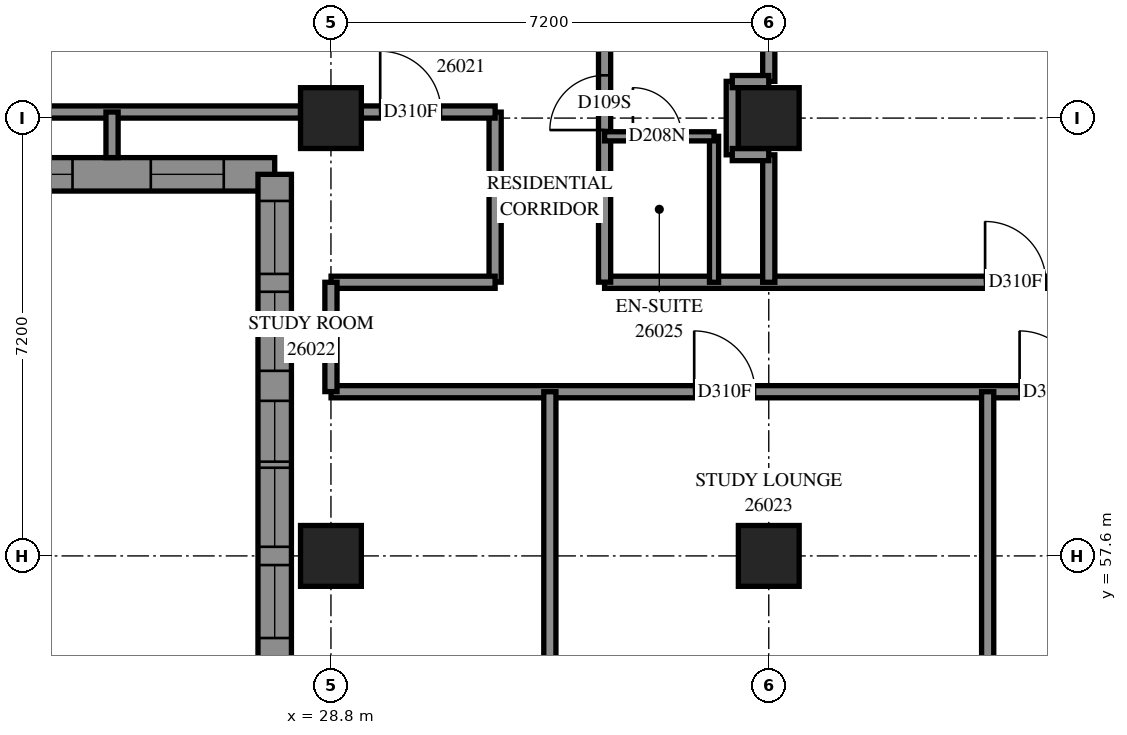
"""IFC4 building model, lengths in metres.
Left out: names, types, materials, properties, quantities, classifications, styles, units other than length and angle.
Written with IfcOpenShell. Run it as: python <this file> out.ifc"""

import sys

from ifc_helpers import new_model, si_unit, direction, frame, frame_2d, origin, origin_2d, place, context, subcontext, project, spatial, polyline, rectangle, outline, extrude, element, fill, save


model = new_model("IFC4")
c1 = context("Model", 3, precision=1e-05, world=origin(), true_north=direction((0.0, 1.0)))
c2 = subcontext(c1, "Body", "Model", "MODEL_VIEW")
j1 = project(units=[si_unit("LENGTHUNIT", "METRE"), si_unit("PLANEANGLEUNIT", "RADIAN")], contexts=[c1])
p1 = place(None, origin())
s1 = spatial("IfcSite", under=j1, at=p1, CompositionType="ELEMENT")
p2 = place(p1, origin())
s2 = spatial("IfcBuilding", under=s1, at=p2, CompositionType="ELEMENT")
p3 = place(p2, frame((0.0, 0.0, 98.2)))
s3 = spatial("IfcBuildingStorey", under=s2, at=p3, CompositionType="ELEMENT", Elevation=98.2)
for number, where, z_axis, x_axis in (
    (1, (28.8, 57.6, 0.0), (0.0, 0.0, 1.0), (1.0, 0.0, 0.0)),
    (2, (28.8, 64.8, 0.0), (0.0, 0.0, 1.0), (1.0, 0.0, 0.0)),
    (3, (36.0, 57.6, 0.0), (0.0, 0.0, 1.0), (1.0, 0.0, 0.0)),
    (4, (36.0, 64.8, 0.0), (0.0, 0.0, 1.0), (1.0, 0.0, 0.0)),
):
    element("IfcColumn", number, at=place(p3, frame(where, z_axis=z_axis, x_axis=x_axis)), inside=s3, PredefinedType="COLUMN", context=c2, shape_type="SweptSolid", body=[
        extrude(rectangle(XDim=1.0, YDim=1.0, at=origin_2d()), origin(), (0.0, 0.0, 1.0), 3.1),
    ])
p4 = place(p3, frame((19.624, 63.875, 0.0), z_axis=(0.0, 0.0, 1.0), x_axis=(1.0, 0.0, 0.0)))
e5 = element("IfcWall", 5, at=p4, inside=s3, PredefinedType="SOLIDWALL", context=c2, shape_type="SweptSolid", body=[
    extrude(outline(polyline([(-0.275, -0.275), (7.976, -0.275), (8.526, 0.275), (0.275, 0.275), (-0.275, -0.275)])), origin(), (0.0, 0.0, 1.0), 3.1),
])
p5 = place(p4, frame((2.126, 0.0, 0.5)))
e6 = element("IfcOpeningElement", 6, at=p5, cuts=e5, PredefinedType="OPENING", context=c2, shape_type="SweptSolid", body=[
    extrude(rectangle(XDim=1.3, YDim=2.45, at=frame_2d((0.65, 1.225))), frame((0.0, 0.285, 0.0), z_axis=(0.0, -1.0, 0.0), x_axis=(1.0, 0.0, 0.0)), (0.0, 0.0, 1.0), 0.57),
])
p6 = place(p4, frame((3.626, 0.0, 0.5)))
e7 = element("IfcOpeningElement", 7, at=p6, cuts=e5, PredefinedType="OPENING", context=c2, shape_type="SweptSolid", body=[
    extrude(rectangle(XDim=1.3, YDim=2.45, at=frame_2d((0.65, 1.225))), frame((0.0, 0.285, 0.0), z_axis=(0.0, -1.0, 0.0), x_axis=(1.0, 0.0, 0.0)), (0.0, 0.0, 1.0), 0.57),
])
p7 = place(p4, frame((0.625, 0.0, 0.5)))
e8 = element("IfcOpeningElement", 8, at=p7, cuts=e5, PredefinedType="OPENING", context=c2, shape_type="SweptSolid", body=[
    extrude(rectangle(XDim=1.2, YDim=2.45, at=frame_2d((0.6, 1.225))), frame((0.0, 0.285, 0.0), z_axis=(0.0, -1.0, 0.0), x_axis=(1.0, 0.0, 0.0)), (0.0, 0.0, 1.0), 0.57),
])
p8 = place(p4, frame((6.213, 0.0, 0.5)))
e9 = element("IfcOpeningElement", 9, at=p8, cuts=e5, PredefinedType="OPENING", context=c2, shape_type="SweptSolid", body=[
    extrude(rectangle(XDim=1.2, YDim=2.45, at=frame_2d((0.6, 1.225))), frame((0.0, 0.285, 0.0), z_axis=(0.0, -1.0, 0.0), x_axis=(1.0, 0.0, 0.0)), (0.0, 0.0, 1.0), 0.57),
])
p9 = place(p3, frame((27.875, 63.875, 0.0), z_axis=(0.0, 0.0, 1.0), x_axis=(0.0, -1.0, 0.0)))
e10 = element("IfcWall", 10, at=p9, inside=s3, PredefinedType="SOLIDWALL", context=c2, shape_type="SweptSolid", body=[
    extrude(outline(polyline([(0.275, -0.275), (8.526, -0.275), (7.976, 0.275), (-0.275, 0.275), (0.275, -0.275)])), origin(), (0.0, 0.0, 1.0), 3.1),
])
p10 = place(p9, frame((4.825, 0.0, 0.5)))
e11 = element("IfcOpeningElement", 11, at=p10, cuts=e10, PredefinedType="OPENING", context=c2, shape_type="SweptSolid", body=[
    extrude(rectangle(XDim=1.3, YDim=2.45, at=frame_2d((0.65, 1.225))), frame((0.0, 0.285, 0.0), z_axis=(0.0, -1.0, 0.0), x_axis=(1.0, 0.0, 0.0)), (0.0, 0.0, 1.0), 0.57),
])
p11 = place(p9, frame((0.438, 0.0, 0.5)))
e12 = element("IfcOpeningElement", 12, at=p11, cuts=e10, PredefinedType="OPENING", context=c2, shape_type="SweptSolid", body=[
    extrude(rectangle(XDim=1.2, YDim=2.45, at=frame_2d((0.6, 1.225))), frame((0.0, 0.285, 0.0), z_axis=(0.0, -1.0, 0.0), x_axis=(1.0, 0.0, 0.0)), (0.0, 0.0, 1.0), 0.57),
])
p12 = place(p9, frame((6.426, 0.0, 0.5)))
e13 = element("IfcOpeningElement", 13, at=p12, cuts=e10, PredefinedType="OPENING", context=c2, shape_type="SweptSolid", body=[
    extrude(rectangle(XDim=1.2, YDim=2.45, at=frame_2d((0.6, 1.225))), frame((0.0, 0.285, 0.0), z_axis=(0.0, -1.0, 0.0), x_axis=(1.0, 0.0, 0.0)), (0.0, 0.0, 1.0), 0.57),
])
p13 = place(p9, frame((1.931, 0.0, 0.5)))
e14 = element("IfcOpeningElement", 14, at=p13, cuts=e10, PredefinedType="OPENING", context=c2, shape_type="SweptSolid", body=[
    extrude(rectangle(XDim=1.3, YDim=2.45, at=frame_2d((0.65, 1.225))), frame((0.0, 0.285, 0.0), z_axis=(0.0, -1.0, 0.0), x_axis=(1.0, 0.0, 0.0)), (0.0, 0.0, 1.0), 0.57),
])
p14 = place(p9, frame((3.725, 0.0, 0.45)))
e15 = element("IfcOpeningElement", 15, at=p14, cuts=e10, PredefinedType="OPENING", context=c2, shape_type="SweptSolid", body=[
    extrude(rectangle(XDim=1.0, YDim=2.5, at=frame_2d((0.5, 1.25))), frame((0.0, 0.285, 0.0), z_axis=(0.0, -1.0, 0.0), x_axis=(1.0, 0.0, 0.0)), (0.0, 0.0, 1.0), 0.57),
])
p15 = place(p3, frame((28.802, 60.3, 0.0), z_axis=(0.0, 0.0, 1.0), x_axis=(1.0, 0.0, 0.0)))
e16 = element("IfcWall", 16, at=p15, inside=s3, PredefinedType="PARTITIONING", context=c2, shape_type="SweptSolid", body=[
    extrude(rectangle(XDim=24.298, YDim=0.2, at=frame_2d((12.149, 0.0))), origin(), (0.0, 0.0, 1.0), 3.1),
])
p16 = place(p15, frame((5.972, 0.0, 0.0)))
e17 = element("IfcOpeningElement", 17, at=p16, cuts=e16, PredefinedType="OPENING", context=c2, shape_type="SweptSolid", body=[
    extrude(rectangle(XDim=1.0, YDim=2.1, at=frame_2d((0.5, 1.05))), frame((0.0, 0.11, 0.0), z_axis=(0.0, -1.0, 0.0), x_axis=(1.0, 0.0, 0.0)), (0.0, 0.0, 1.0), 0.22),
])
p17 = place(p15, frame((11.323, 0.0, 0.0)))
e18 = element("IfcOpeningElement", 18, at=p17, cuts=e16, PredefinedType="OPENING", context=c2, shape_type="SweptSolid", body=[
    extrude(rectangle(XDim=1.0, YDim=2.1, at=frame_2d((0.5, 1.05))), frame((0.0, 0.11, 0.0), z_axis=(0.0, -1.0, 0.0), x_axis=(1.0, 0.0, 0.0)), (0.0, 0.0, 1.0), 0.22),
])
p18 = place(p15, frame((14.798, 0.0, 0.0)))
e19 = element("IfcOpeningElement", 19, at=p18, cuts=e16, PredefinedType="OPENING", context=c2, shape_type="SweptSolid", body=[
    extrude(rectangle(XDim=0.9, YDim=2.1, at=frame_2d((0.45, 1.05))), frame((0.0, 0.11, 0.0), z_axis=(0.0, -1.0, 0.0), x_axis=(1.0, 0.0, 0.0)), (0.0, 0.0, 1.0), 0.22),
])
p19 = place(p15, frame((18.833, 0.0, 0.0)))
e20 = element("IfcOpeningElement", 20, at=p19, cuts=e16, PredefinedType="OPENING", context=c2, shape_type="SweptSolid", body=[
    extrude(rectangle(XDim=1.0, YDim=2.1, at=frame_2d((0.5, 1.05))), frame((0.0, 0.11, 0.0), z_axis=(0.0, -1.0, 0.0), x_axis=(1.0, 0.0, 0.0)), (0.0, 0.0, 1.0), 0.22),
])
p20 = place(p15, frame((23.151, 0.0, 0.0)))
e21 = element("IfcOpeningElement", 21, at=p20, cuts=e16, PredefinedType="OPENING", context=c2, shape_type="SweptSolid", body=[
    extrude(rectangle(XDim=1.0, YDim=2.1, at=frame_2d((0.5, 1.05))), frame((0.0, 0.11, 0.0), z_axis=(0.0, -1.0, 0.0), x_axis=(1.0, 0.0, 0.0)), (0.0, 0.0, 1.0), 0.22),
])
p21 = place(p3, frame((33.3, 62.1, 0.0), z_axis=(0.0, 0.0, 1.0), x_axis=(1.0, 0.0, 0.0)))
e22 = element("IfcWall", 22, at=p21, inside=s3, PredefinedType="PARTITIONING", context=c2, shape_type="SweptSolid", body=[
    extrude(rectangle(XDim=17.1, YDim=0.2, at=frame_2d((8.55, 0.0))), origin(), (0.0, 0.0, 1.0), 3.1),
])
p22 = place(p21, frame((6.258, 0.0, 0.0)))
e23 = element("IfcOpeningElement", 23, at=p22, cuts=e22, PredefinedType="OPENING", context=c2, shape_type="SweptSolid", body=[
    extrude(rectangle(XDim=1.0, YDim=2.1, at=frame_2d((0.5, 1.05))), frame((0.0, 0.11, 0.0), z_axis=(0.0, -1.0, 0.0), x_axis=(1.0, 0.0, 0.0)), (0.0, 0.0, 1.0), 0.22),
])
p23 = place(p21, frame((10.148, 0.0, 0.0)))
e24 = element("IfcOpeningElement", 24, at=p23, cuts=e22, PredefinedType="OPENING", context=c2, shape_type="SweptSolid", body=[
    extrude(rectangle(XDim=0.9, YDim=2.1, at=frame_2d((0.45, 1.05))), frame((0.0, 0.11, 0.0), z_axis=(0.0, -1.0, 0.0), x_axis=(1.0, 0.0, 0.0)), (0.0, 0.0, 1.0), 0.22),
])
p24 = place(p21, frame((15.729, 0.0, 0.0)))
e25 = element("IfcOpeningElement", 25, at=p24, cuts=e22, PredefinedType="OPENING", context=c2, shape_type="SweptSolid", body=[
    extrude(rectangle(XDim=0.9, YDim=2.1, at=frame_2d((0.45, 1.05))), frame((0.0, 0.11, 0.0), z_axis=(0.0, -1.0, 0.0), x_axis=(1.0, 0.0, 0.0)), (0.0, 0.0, 1.0), 0.22),
])
p25 = place(p3, frame((22.1, 64.9, 0.0), z_axis=(0.0, 0.0, 1.0), x_axis=(1.0, 0.0, 0.0)))
e26 = element("IfcWall", 26, at=p25, inside=s3, PredefinedType="PARTITIONING", context=c2, shape_type="SweptSolid", body=[
    extrude(rectangle(XDim=6.2, YDim=0.2, at=frame_2d((3.1, 0.0))), origin(), (0.0, 0.0, 1.0), 2.6),
])
p26 = place(p3, frame((36.0, 65.404, 0.0), z_axis=(0.0, 0.0, 1.0), x_axis=(0.0, 1.0, 0.0)))
e27 = element("IfcWall", 27, at=p26, inside=s3, PredefinedType="PARTITIONING", context=c2, shape_type="SweptSolid", body=[
    extrude(rectangle(XDim=5.992, YDim=0.2, at=frame_2d((2.996, 0.0))), origin(), (0.0, 0.0, 1.0), 3.1),
])
p27 = place(p3, frame((33.3, 62.102, 0.0), z_axis=(0.0, 0.0, 1.0), x_axis=(0.0, 1.0, 0.0)))
e28 = element("IfcWall", 28, at=p27, inside=s3, PredefinedType="PARTITIONING", context=c2, shape_type="SweptSolid", body=[
    extrude(rectangle(XDim=4.598, YDim=0.2, at=frame_2d((2.299, 0.0))), origin(), (0.0, 0.0, 1.0), 3.1),
])
p28 = place(p27, frame((2.501, 0.0, 0.0)))
e29 = element("IfcOpeningElement", 29, at=p28, cuts=e28, PredefinedType="OPENING", context=c2, shape_type="SweptSolid", body=[
    extrude(rectangle(XDim=0.9, YDim=2.1, at=frame_2d((0.45, 1.05))), frame((0.0, 0.11, 0.0), z_axis=(0.0, -1.0, 0.0), x_axis=(1.0, 0.0, 0.0)), (0.0, 0.0, 1.0), 0.22),
])
for number, where, z_axis, x_axis in (
    (30, (32.4, 55.899, 0.0), (0.0, 0.0, 1.0), (0.0, 1.0, 0.0)),
    (31, (39.6, 55.899, 0.0), (0.0, 0.0, 1.0), (0.0, 1.0, 0.0)),
):
    element("IfcWall", number, at=place(p3, frame(where, z_axis=z_axis, x_axis=x_axis)), inside=s3, PredefinedType="PARTITIONING", context=c2, shape_type="SweptSolid", body=[
        extrude(rectangle(XDim=4.401, YDim=0.2, at=frame_2d((2.2, 0.0))), origin(), (0.0, 0.0, 1.0), 3.1),
    ])
p29 = place(p3, frame((31.5, 62.102, 0.0), z_axis=(0.0, 0.0, 1.0), x_axis=(0.0, 1.0, 0.0)))
e32 = element("IfcWall", 32, at=p29, inside=s3, PredefinedType="PARTITIONING", context=c2, shape_type="SweptSolid", body=[
    extrude(rectangle(XDim=2.796, YDim=0.2, at=frame_2d((1.398, 0.0))), origin(), (0.0, 0.0, 1.0), 3.1),
])
p30 = place(p3, frame((28.802, 62.1, 0.0), z_axis=(0.0, 0.0, 1.0), x_axis=(1.0, 0.0, 0.0)))
e33 = element("IfcWall", 33, at=p30, inside=s3, PredefinedType="PARTITIONING", context=c2, shape_type="SweptSolid", body=[
    extrude(rectangle(XDim=2.698, YDim=0.2, at=frame_2d((1.349, 0.0))), origin(), (0.0, 0.0, 1.0), 3.1),
])
p31 = place(p3, frame((35.1, 62.1, 0.0), z_axis=(0.0, 0.0, 1.0), x_axis=(0.0, 1.0, 0.0)))
e34 = element("IfcWall", 34, at=p31, inside=s3, PredefinedType="PARTITIONING", context=c2, shape_type="SweptSolid", body=[
    extrude(rectangle(XDim=2.4, YDim=0.15, at=frame_2d((1.2, 0.0))), origin(), (0.0, 0.0, 1.0), 3.1),
])
p32 = place(p3, frame((29.3, 64.9, 0.0), z_axis=(0.0, 0.0, 1.0), x_axis=(1.0, 0.0, 0.0)))
e35 = element("IfcWall", 35, at=p32, inside=s3, PredefinedType="PARTITIONING", context=c2, shape_type="SweptSolid", body=[
    extrude(rectangle(XDim=2.2, YDim=0.2, at=frame_2d((1.1, 0.0))), origin(), (0.0, 0.0, 1.0), 3.1),
])
p33 = place(p32, frame((0.31, 0.0, 0.0)))
e36 = element("IfcOpeningElement", 36, at=p33, cuts=e35, PredefinedType="OPENING", context=c2, shape_type="SweptSolid", body=[
    extrude(rectangle(XDim=1.0, YDim=2.1, at=frame_2d((0.5, 1.05))), frame((0.0, 0.11, 0.0), z_axis=(0.0, -1.0, 0.0), x_axis=(1.0, 0.0, 0.0)), (0.0, 0.0, 1.0), 0.22),
])
p34 = place(p3, frame((36.0, 62.1, 0.0), z_axis=(0.0, 0.0, 1.0), x_axis=(0.0, 1.0, 0.0)))
e37 = element("IfcWall", 37, at=p34, inside=s3, PredefinedType="PARTITIONING", context=c2, shape_type="SweptSolid", body=[
    extrude(rectangle(XDim=2.096, YDim=0.2, at=frame_2d((1.048, 0.0))), origin(), (0.0, 0.0, 1.0), 3.1),
])
p35 = place(p3, frame((33.3, 64.5, 0.0), z_axis=(0.0, 0.0, 1.0), x_axis=(1.0, 0.0, 0.0)))
e38 = element("IfcWall", 38, at=p35, inside=s3, PredefinedType="PARTITIONING", context=c2, shape_type="SweptSolid", body=[
    extrude(rectangle(XDim=1.8, YDim=0.15, at=frame_2d((0.9, 0.0))), origin(), (0.0, 0.0, 1.0), 3.1),
])
p36 = place(p35, frame((0.466, 0.0, 0.0)))
e39 = element("IfcOpeningElement", 39, at=p36, cuts=e38, PredefinedType="OPENING", context=c2, shape_type="SweptSolid", body=[
    extrude(rectangle(XDim=0.8, YDim=2.1, at=frame_2d((0.4, 1.05))), frame((0.0, 0.085, 0.0), z_axis=(0.0, -1.0, 0.0), x_axis=(1.0, 0.0, 0.0)), (0.0, 0.0, 1.0), 0.17),
])
p37 = place(p3, frame((28.8, 60.302, 0.0), z_axis=(0.0, 0.0, 1.0), x_axis=(0.0, 1.0, 0.0)))
e40 = element("IfcWall", 40, at=p37, inside=s3, PredefinedType="PARTITIONING", context=c2, shape_type="SweptSolid", body=[
    extrude(rectangle(XDim=1.798, YDim=0.2, at=frame_2d((0.899, 0.0))), origin(), (0.0, 0.0, 1.0), 2.6),
])
p38 = place(p3, frame((35.4, 64.196, 0.0), z_axis=(0.0, 0.0, 1.0), x_axis=(0.0, 1.0, 0.0)))
e41 = element("IfcWall", 41, at=p38, inside=s3, PredefinedType="PARTITIONING", context=c2, shape_type="SweptSolid", body=[
    extrude(rectangle(XDim=1.208, YDim=0.2, at=frame_2d((0.604, 0.0))), origin(), (0.0, 0.0, 1.0), 3.1),
])
p39 = place(p3, frame((25.2, 64.15, 0.0), z_axis=(0.0, 0.0, 1.0), x_axis=(0.0, 1.0, 0.0)))
e42 = element("IfcWall", 42, at=p39, inside=s3, PredefinedType="PARTITIONING", context=c2, shape_type="SweptSolid", body=[
    extrude(rectangle(XDim=0.75, YDim=0.2, at=frame_2d((0.375, 0.0))), origin(), (0.0, 0.0, 1.0), 3.1),
])
for number, where, z_axis, x_axis in (
    (43, (35.4, 65.4, 0.0), (0.0, 0.0, 1.0), (1.0, 0.0, 0.0)),
    (44, (35.4, 64.2, 0.0), (0.0, 0.0, 1.0), (1.0, 0.0, 0.0)),
):
    element("IfcWall", number, at=place(p3, frame(where, z_axis=z_axis, x_axis=x_axis)), inside=s3, PredefinedType="PARTITIONING", context=c2, shape_type="SweptSolid", body=[
        extrude(rectangle(XDim=0.6, YDim=0.2, at=frame_2d((0.3, 0.0))), origin(), (0.0, 0.0, 1.0), 3.1),
    ])
p40 = place(p6, origin())
e45 = element("IfcWindow", 45, at=p40, inside=s3, PartitioningType="SINGLE_PANEL", PredefinedType="WINDOW", context=c2, shape_type="SweptSolid", body=[
    extrude(rectangle(XDim=1.3, YDim=2.45, at=frame_2d((0.65, 1.225))), frame((0.0, 0.155, 0.0), z_axis=(0.0, -1.0, 0.0), x_axis=(1.0, 0.0, 0.0)), (0.0, 0.0, 1.0), 0.06),
])
fill(e7, e45)
p41 = place(p8, origin())
e46 = element("IfcWindow", 46, at=p41, inside=s3, PartitioningType="SINGLE_PANEL", PredefinedType="WINDOW", context=c2, shape_type="SweptSolid", body=[
    extrude(rectangle(XDim=1.2, YDim=2.45, at=frame_2d((0.6, 1.225))), frame((0.0, 0.155, 0.0), z_axis=(0.0, -1.0, 0.0), x_axis=(1.0, 0.0, 0.0)), (0.0, 0.0, 1.0), 0.06),
])
fill(e9, e46)
p42 = place(p10, origin())
e47 = element("IfcWindow", 47, at=p42, inside=s3, PartitioningType="SINGLE_PANEL", PredefinedType="WINDOW", context=c2, shape_type="SweptSolid", body=[
    extrude(rectangle(XDim=1.3, YDim=2.45, at=frame_2d((0.65, 1.225))), frame((0.0, 0.155, 0.0), z_axis=(0.0, -1.0, 0.0), x_axis=(1.0, 0.0, 0.0)), (0.0, 0.0, 1.0), 0.06),
])
fill(e11, e47)
p43 = place(p11, origin())
e48 = element("IfcWindow", 48, at=p43, inside=s3, PartitioningType="SINGLE_PANEL", PredefinedType="WINDOW", context=c2, shape_type="SweptSolid", body=[
    extrude(rectangle(XDim=1.2, YDim=2.45, at=frame_2d((0.6, 1.225))), frame((0.0, 0.155, 0.0), z_axis=(0.0, -1.0, 0.0), x_axis=(1.0, 0.0, 0.0)), (0.0, 0.0, 1.0), 0.06),
])
fill(e12, e48)
p44 = place(p12, origin())
e49 = element("IfcWindow", 49, at=p44, inside=s3, PartitioningType="SINGLE_PANEL", PredefinedType="WINDOW", context=c2, shape_type="SweptSolid", body=[
    extrude(rectangle(XDim=1.2, YDim=2.45, at=frame_2d((0.6, 1.225))), frame((0.0, 0.155, 0.0), z_axis=(0.0, -1.0, 0.0), x_axis=(1.0, 0.0, 0.0)), (0.0, 0.0, 1.0), 0.06),
])
fill(e13, e49)
p45 = place(p33, origin())
e50 = element("IfcDoor", 50, at=p45, inside=s3, OperationType="SINGLE_SWING_RIGHT", PredefinedType="DOOR", context=c2, shape_type="SweptSolid", body=[
    extrude(rectangle(XDim=1.0, YDim=2.1, at=frame_2d((0.5, 1.05))), frame((0.0, 0.025, 0.0), z_axis=(0.0, -1.0, 0.0), x_axis=(1.0, 0.0, 0.0)), (0.0, 0.0, 1.0), 0.05),
])
fill(e36, e50)
p46 = place(p16, origin())
e51 = element("IfcDoor", 51, at=p46, inside=s3, OperationType="SINGLE_SWING_RIGHT", PredefinedType="DOOR", context=c2, shape_type="SweptSolid", body=[
    extrude(rectangle(XDim=1.0, YDim=2.1, at=frame_2d((0.5, 1.05))), frame((0.0, 0.025, 0.0), z_axis=(0.0, -1.0, 0.0), x_axis=(1.0, 0.0, 0.0)), (0.0, 0.0, 1.0), 0.05),
])
fill(e17, e51)
p47 = place(p28, origin())
e52 = element("IfcDoor", 52, at=p47, inside=s3, OperationType="SINGLE_SWING_LEFT", PredefinedType="DOOR", context=c2, shape_type="SweptSolid", body=[
    extrude(rectangle(XDim=0.9, YDim=2.1, at=frame_2d((0.45, 1.05))), frame((0.0, 0.025, 0.0), z_axis=(0.0, -1.0, 0.0), x_axis=(1.0, 0.0, 0.0)), (0.0, 0.0, 1.0), 0.05),
])
fill(e29, e52)
p48 = place(p36, origin())
e53 = element("IfcDoor", 53, at=p48, inside=s3, OperationType="SINGLE_SWING_RIGHT", PredefinedType="DOOR", context=c2, shape_type="SweptSolid", body=[
    extrude(rectangle(XDim=0.8, YDim=2.1, at=frame_2d((0.4, 1.05))), frame((0.0, 0.025, 0.0), z_axis=(0.0, -1.0, 0.0), x_axis=(1.0, 0.0, 0.0)), (0.0, 0.0, 1.0), 0.05),
])
fill(e39, e53)
p49 = place(p22, origin())
e54 = element("IfcDoor", 54, at=p49, inside=s3, OperationType="SINGLE_SWING_RIGHT", PredefinedType="DOOR", context=c2, shape_type="SweptSolid", body=[
    extrude(rectangle(XDim=1.0, YDim=2.1, at=frame_2d((0.5, 1.05))), frame((0.0, 0.025, 0.0), z_axis=(0.0, -1.0, 0.0), x_axis=(1.0, 0.0, 0.0)), (0.0, 0.0, 1.0), 0.05),
])
fill(e23, e54)
p50 = place(p17, origin())
e55 = element("IfcDoor", 55, at=p50, inside=s3, OperationType="SINGLE_SWING_RIGHT", PredefinedType="DOOR", context=c2, shape_type="SweptSolid", body=[
    extrude(rectangle(XDim=1.0, YDim=2.1, at=frame_2d((0.5, 1.05))), frame((0.0, 0.025, 0.0), z_axis=(0.0, -1.0, 0.0), x_axis=(1.0, 0.0, 0.0)), (0.0, 0.0, 1.0), 0.05),
])
fill(e18, e55)
p51 = place(p13, origin())
e56 = element("IfcWindow", 56, at=p51, inside=s3, PartitioningType="SINGLE_PANEL", PredefinedType="WINDOW", context=c2, shape_type="SweptSolid", body=[
    extrude(rectangle(XDim=1.3, YDim=2.45, at=frame_2d((0.65, 1.225))), frame((0.0, 0.155, 0.0), z_axis=(0.0, -1.0, 0.0), x_axis=(1.0, 0.0, 0.0)), (0.0, 0.0, 1.0), 0.06),
])
fill(e14, e56)
p52 = place(p14, origin())
e57 = element("IfcWindow", 57, at=p52, inside=s3, PartitioningType="SINGLE_PANEL", PredefinedType="WINDOW", context=c2, shape_type="SweptSolid", body=[
    extrude(rectangle(XDim=1.0, YDim=2.5, at=frame_2d((0.5, 1.25))), frame((0.0, 0.155, 0.0), z_axis=(0.0, -1.0, 0.0), x_axis=(1.0, 0.0, 0.0)), (0.0, 0.0, 1.0), 0.06),
])
fill(e15, e57)
save(model, sys.argv[1])
